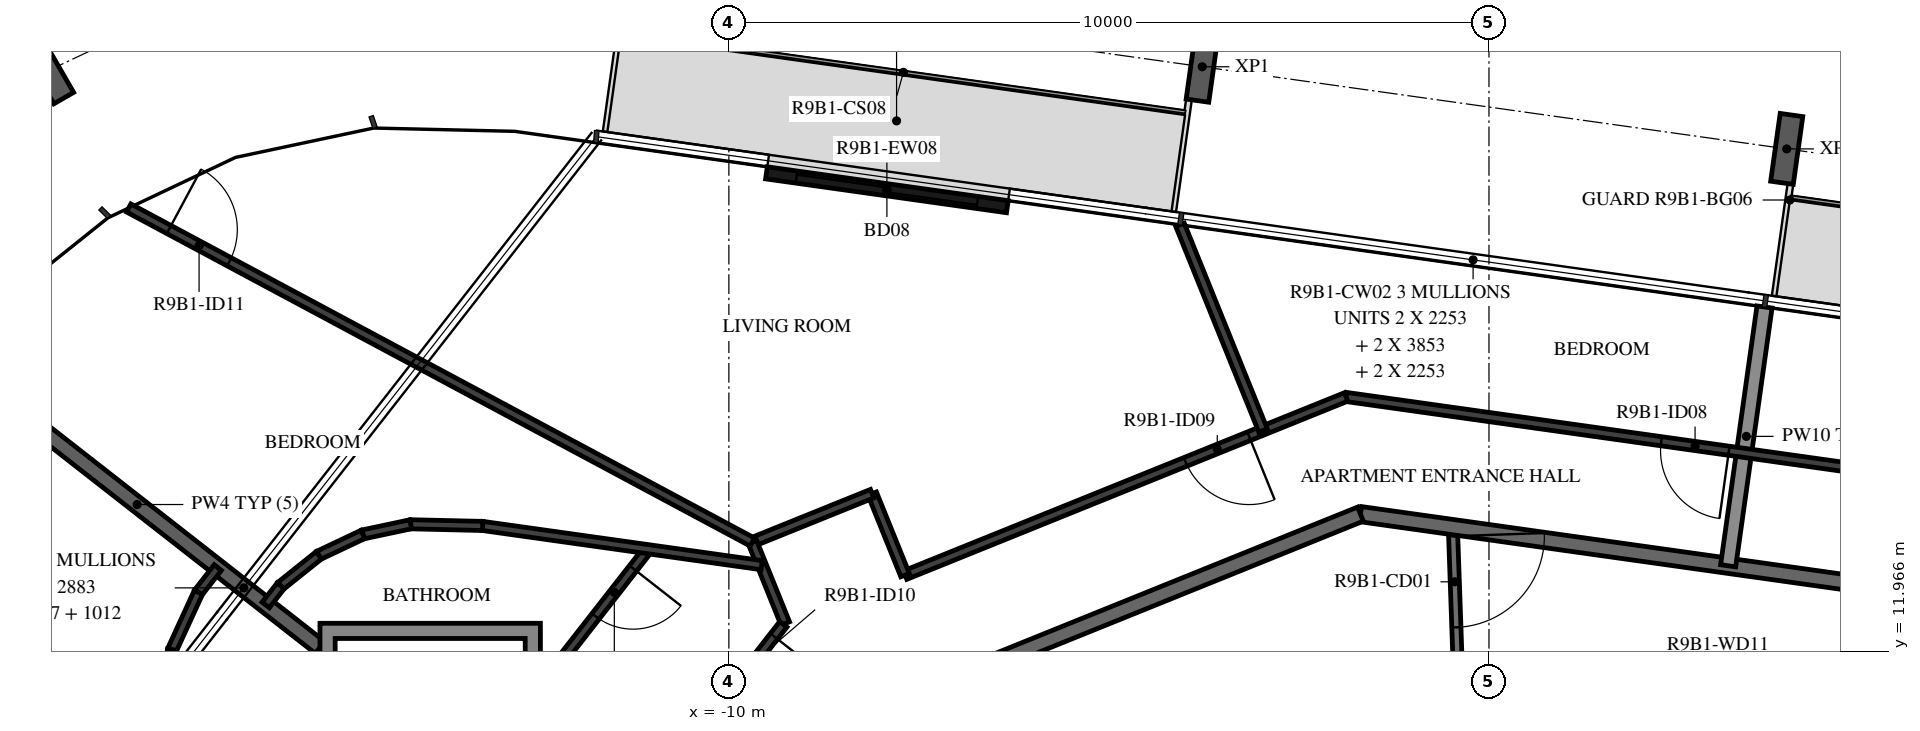
"""IFC4 building model, lengths in metres.
Left out: names, types, materials, properties, quantities, classifications, styles, units other than length and angle.
Written with IfcOpenShell. Run it as: python <this file> out.ifc"""

import sys

from ifc_helpers import new_model, si_unit, direction, frame, frame_2d, origin, origin_2d, place, context, subcontext, project, spatial, polyline, rectangle, i_section, outline, extrude, element, fill, save


model = new_model("IFC4")
c1 = context("Model", 3, precision=1e-05, world=origin(), true_north=direction((0.0, 1.0)))
c2 = subcontext(c1, "Body", "Model", "MODEL_VIEW")
j1 = project(units=[si_unit("LENGTHUNIT", "METRE"), si_unit("PLANEANGLEUNIT", "RADIAN")], contexts=[c1])
p1 = place(None, origin())
s1 = spatial("IfcSite", under=j1, at=p1, CompositionType="ELEMENT")
p2 = place(p1, origin())
s2 = spatial("IfcBuilding", under=s1, at=p2, CompositionType="ELEMENT")
p3 = place(p2, frame((0.0, 0.0, 343.5)))
s3 = spatial("IfcBuildingStorey", under=s2, at=p3, CompositionType="ELEMENT", Elevation=343.5)
for number, where, z_axis, x_axis in (
    (1, (3.917, 18.574, -0.38), (0.0, 0.0, 1.0), (0.99, -0.139, 0.0)),
    (2, (-3.773, 19.655, -0.38), (0.0, 0.0, 1.0), (0.99, -0.139, 0.0)),
    (3, (-18.976, 19.632, -0.38), (0.0, 0.0, 1.0), (0.866, 0.5, 0.0)),
):
    element("IfcColumn", number, at=place(p3, frame(where, z_axis=z_axis, x_axis=x_axis)), inside=s3, PredefinedType="COLUMN", context=c2, shape_type="SweptSolid", body=[
        extrude(i_section(OverallWidth=0.3, OverallDepth=0.9, WebThickness=0.019, FlangeThickness=0.035, FilletRadius=0.03, at=origin_2d()), origin(), (0.0, 0.0, 1.0), 3.5),
    ])
p4 = place(p3, frame((-6.337, 17.814, 0.0), z_axis=(0.0, 0.0, 1.0), x_axis=(-0.99026890462, 0.13916715325, 0.0)))
e4 = element("IfcWall", 4, at=p4, inside=s3, PredefinedType="STANDARD", context=c2, shape_type="SweptSolid", body=[
    extrude(rectangle(XDim=3.2, YDim=0.16, at=frame_2d((1.6, 0.0))), origin(), (0.0, 0.0, 1.0), 3.12),
])
p5 = place(p4, frame((0.4, 0.0, 0.0)))
e5 = element("IfcOpeningElement", 5, at=p5, cuts=e4, PredefinedType="OPENING", context=c2, shape_type="SweptSolid", body=[
    extrude(rectangle(XDim=2.4, YDim=2.4, at=frame_2d((1.2, 1.2))), frame((0.0, 0.09, 0.0), z_axis=(0.0, -1.0, 0.0), x_axis=(1.0, 0.0, 0.0)), (0.0, 0.0, 1.0), 0.18),
])
p6 = place(p3, frame((-0.475, 13.598, 0.0), z_axis=(0.0, 0.0, 1.0), x_axis=(0.034852521429, -0.999392466326, 0.0)))
e6 = element("IfcWall", 6, at=p6, inside=s3, PredefinedType="PARTITIONING", context=c2, shape_type="SweptSolid", body=[
    extrude(rectangle(XDim=1.702, YDim=0.12, at=frame_2d((0.851, 0.0))), origin(), (0.0, 0.0, 1.0), 3.12),
])
p7 = place(p6, frame((0.12, 0.0, 0.0)))
e7 = element("IfcOpeningElement", 7, at=p7, cuts=e6, PredefinedType="OPENING", context=c2, shape_type="SweptSolid", body=[
    extrude(rectangle(XDim=1.2, YDim=2.1, at=frame_2d((0.6, 1.05))), frame((0.0, 0.07, 0.0), z_axis=(0.0, -1.0, 0.0), x_axis=(1.0, 0.0, 0.0)), (0.0, 0.0, 1.0), 0.14),
])
p8 = place(p3, frame((5.42, 12.77, 0.0), z_axis=(0.0, 0.0, 1.0), x_axis=(-0.990270565508, 0.139155334385, 0.0)))
e8 = element("IfcWall", 8, at=p8, inside=s3, PredefinedType="STANDARD", context=c2, shape_type="SweptSolid", body=[
    extrude(rectangle(XDim=7.181, YDim=0.2, at=frame_2d((3.59, 0.0))), origin(), (0.0, 0.0, 1.0), 3.12),
])
p9 = place(p3, frame((-1.691, 13.769, 0.0), z_axis=(0.0, 0.0, 1.0), x_axis=(-0.92717916932, -0.374618189599, 0.0)))
e9 = element("IfcWall", 9, at=p9, inside=s3, PredefinedType="STANDARD", context=c2, shape_type="SweptSolid", body=[
    extrude(rectangle(XDim=7.181, YDim=0.2, at=frame_2d((3.591, 0.0))), origin(), (0.0, 0.0, 1.0), 3.12),
])
p10 = place(p3, frame((3.625, 16.494, 0.0), z_axis=(0.0, 0.0, 1.0), x_axis=(-0.139174320859, -0.990267897295, 0.0)))
e10 = element("IfcWall", 10, at=p10, inside=s3, PredefinedType="STANDARD", context=c2, shape_type="SweptSolid", body=[
    extrude(rectangle(XDim=3.438, YDim=0.2, at=frame_2d((1.719, 0.0))), origin(), (0.0, 0.0, 1.0), 2.73),
])
p11 = place(p3, frame((-20.191, 15.775, 0.0), z_axis=(0.0, 0.0, 1.0), x_axis=(0.788021948923, -0.615647145706, 0.0)))
e11 = element("IfcWall", 11, at=p11, inside=s3, PredefinedType="STANDARD", context=c2, shape_type="SweptSolid", body=[
    extrude(rectangle(XDim=6.106, YDim=0.2, at=frame_2d((3.053, 0.0))), origin(), (0.0, 0.0, 1.0), 3.12),
])
p12 = place(p3, frame((6.027, 14.199, 0.0), z_axis=(0.0, 0.0, 1.0), x_axis=(-0.990271593532, 0.139148018469, 0.0)))
e12 = element("IfcWall", 12, at=p12, inside=s3, PredefinedType="PARTITIONING", context=c2, shape_type="SweptSolid", body=[
    extrude(rectangle(XDim=7.985, YDim=0.12, at=frame_2d((3.992, 0.0))), origin(), (0.0, 0.0, 1.0), 3.12),
])
p13 = place(p12, frame((2.898, 0.0, 0.0)))
e13 = element("IfcOpeningElement", 13, at=p13, cuts=e12, PredefinedType="OPENING", context=c2, shape_type="SweptSolid", body=[
    extrude(rectangle(XDim=0.9, YDim=2.1, at=frame_2d((0.45, 1.05))), frame((0.0, 0.07, 0.0), z_axis=(0.0, -1.0, 0.0), x_axis=(1.0, 0.0, 0.0)), (0.0, 0.0, 1.0), 0.14),
])
p14 = place(p3, frame((-1.88, 15.311, 0.0), z_axis=(0.0, 0.0, 1.0), x_axis=(-0.927182163322, -0.374610779365, 0.0)))
e14 = element("IfcWall", 14, at=p14, inside=s3, PredefinedType="PARTITIONING", context=c2, shape_type="SweptSolid", body=[
    extrude(rectangle(XDim=6.257, YDim=0.12, at=frame_2d((3.128, 0.0))), origin(), (0.0, 0.0, 1.0), 3.12),
])
p15 = place(p14, frame((1.377, 0.0, 0.0)))
e15 = element("IfcOpeningElement", 15, at=p15, cuts=e14, PredefinedType="OPENING", context=c2, shape_type="SweptSolid", body=[
    extrude(rectangle(XDim=0.9, YDim=2.1, at=frame_2d((0.45, 1.05))), frame((0.0, 0.07, 0.0), z_axis=(0.0, -1.0, 0.0), x_axis=(1.0, 0.0, 0.0)), (0.0, 0.0, 1.0), 0.14),
])
p16 = place(p3, frame((-7.681, 12.967, 0.0), z_axis=(0.0, 0.0, 1.0), x_axis=(-0.374592224266, 0.927189659951, 0.0)))
e16 = element("IfcWall", 16, at=p16, inside=s3, PredefinedType="PARTITIONING", context=c2, shape_type="SweptSolid", body=[
    extrude(rectangle(XDim=1.156, YDim=0.12, at=frame_2d((0.578, 0.0))), origin(), (0.0, 0.0, 1.0), 3.12),
])
p17 = place(p3, frame((-8.115, 14.039, 0.0), z_axis=(0.0, 0.0, 1.0), x_axis=(-0.927153589835, -0.374681492546, 0.0)))
e17 = element("IfcWall", 17, at=p17, inside=s3, PredefinedType="PARTITIONING", context=c2, shape_type="SweptSolid", body=[
    extrude(rectangle(XDim=1.7, YDim=0.12, at=frame_2d((0.85, 0.0))), origin(), (0.0, 0.0, 1.0), 3.12),
])
p18 = place(p3, frame((-9.691, 13.402, 0.0), z_axis=(0.0, 0.0, 1.0), x_axis=(0.374484003097, -0.927233374844, 0.0)))
e18 = element("IfcWall", 18, at=p18, inside=s3, PredefinedType="PARTITIONING", context=c2, shape_type="SweptSolid", body=[
    extrude(rectangle(XDim=1.156, YDim=0.12, at=frame_2d((0.578, 0.0))), origin(), (0.0, 0.0, 1.0), 3.12),
])
p19 = place(p3, frame((-9.283, 12.319, 0.0), z_axis=(0.0, 0.0, 1.0), x_axis=(-0.61567489546, -0.788000268464, 0.0)))
e19 = element("IfcWall", 19, at=p19, inside=s3, PredefinedType="PARTITIONING", context=c2, shape_type="SweptSolid", body=[
    extrude(rectangle(XDim=7.985, YDim=0.12, at=frame_2d((3.992, 0.0))), origin(), (0.0, 0.0, 1.0), 3.12),
])
p20 = place(p19, frame((0.2, 0.0, 0.0)))
e20 = element("IfcOpeningElement", 20, at=p20, cuts=e19, PredefinedType="OPENING", context=c2, shape_type="SweptSolid", body=[
    extrude(rectangle(XDim=0.9, YDim=2.1, at=frame_2d((0.45, 1.05))), frame((0.0, 0.07, 0.0), z_axis=(0.0, -1.0, 0.0), x_axis=(1.0, 0.0, 0.0)), (0.0, 0.0, 1.0), 0.14),
])
p21 = place(p19, frame((4.592, 0.0, 0.0)))
e21 = element("IfcOpeningElement", 21, at=p21, cuts=e19, PredefinedType="OPENING", context=c2, shape_type="SweptSolid", body=[
    extrude(rectangle(XDim=0.9, YDim=2.1, at=frame_2d((0.45, 1.05))), frame((0.0, 0.07, 0.0), z_axis=(0.0, -1.0, 0.0), x_axis=(1.0, 0.0, 0.0)), (0.0, 0.0, 1.0), 0.14),
])
p22 = place(p3, frame((-4.065, 17.575, 0.0), z_axis=(0.0, 0.0, 1.0), x_axis=(0.374619347258, -0.927178701578, 0.0)))
e22 = element("IfcWall", 22, at=p22, inside=s3, PredefinedType="PARTITIONING", context=c2, shape_type="SweptSolid", body=[
    extrude(rectangle(XDim=2.918, YDim=0.12, at=frame_2d((1.459, 0.0))), origin(), (0.0, 0.0, 1.0), 3.12),
])
p23 = place(p3, frame((-17.896, 17.797, 0.0), z_axis=(0.0, 0.0, 1.0), x_axis=(0.88150492406, -0.4721748287, 0.0)))
e23 = element("IfcWall", 23, at=p23, inside=s3, PredefinedType="PARTITIONING", context=c2, shape_type="SweptSolid", body=[
    extrude(rectangle(XDim=9.308, YDim=0.12, at=frame_2d((4.654, 0.0))), origin(), (0.0, 0.0, 1.0), 3.12),
])
p24 = place(p23, frame((0.6, 0.0, 0.0)))
e24 = element("IfcOpeningElement", 24, at=p24, cuts=e23, PredefinedType="OPENING", context=c2, shape_type="SweptSolid", body=[
    extrude(rectangle(XDim=0.9, YDim=2.1, at=frame_2d((0.45, 1.05))), frame((0.0, 0.07, 0.0), z_axis=(0.0, -1.0, 0.0), x_axis=(1.0, 0.0, 0.0)), (0.0, 0.0, 1.0), 0.14),
])
p25 = place(p3, frame((-11.064, 13.308, 0.0), z_axis=(0.0, 0.0, 1.0), x_axis=(-0.615681126827, -0.787995399777, 0.0)))
e25 = element("IfcWall", 25, at=p25, inside=s3, PredefinedType="PARTITIONING", context=c2, shape_type="SweptSolid", body=[
    extrude(rectangle(XDim=2.3, YDim=0.12, at=frame_2d((1.15, 0.0))), origin(), (0.0, 0.0, 1.0), 3.12),
])
p26 = place(p25, frame((0.32, 0.0, 0.0)))
e26 = element("IfcOpeningElement", 26, at=p26, cuts=e25, PredefinedType="OPENING", context=c2, shape_type="SweptSolid", body=[
    extrude(rectangle(XDim=0.8, YDim=2.1, at=frame_2d((0.4, 1.05))), frame((0.0, 0.07, 0.0), z_axis=(0.0, -1.0, 0.0), x_axis=(1.0, 0.0, 0.0)), (0.0, 0.0, 1.0), 0.14),
])
p27 = place(p3, frame((-9.568, 13.097, 0.0), z_axis=(0.0, 0.0, 1.0), x_axis=(-0.990266931728, 0.13918119099, 0.0)))
e27 = element("IfcWall", 27, at=p27, inside=s3, PredefinedType="PARTITIONING", context=c2, shape_type="SweptSolid", body=[
    extrude(rectangle(XDim=3.708, YDim=0.12, at=frame_2d((1.854, 0.0))), origin(), (0.0, 0.0, 1.0), 3.12),
])
p28 = place(p3, frame((-13.24, 13.614, 0.0), z_axis=(0.0, 0.0, 1.0), x_axis=(-0.999730529074, 0.023213557177, 0.0)))
e28 = element("IfcWall", 28, at=p28, inside=s3, PredefinedType="PARTITIONING", context=c2, shape_type="SweptSolid", body=[
    extrude(rectangle(XDim=0.947, YDim=0.12, at=frame_2d((0.473, 0.0))), origin(), (0.0, 0.0, 1.0), 3.12),
])
p29 = place(p3, frame((-14.186, 13.635, 0.0), z_axis=(0.0, 0.0, 1.0), x_axis=(-0.978217752025, -0.207581380725, 0.0)))
e29 = element("IfcWall", 29, at=p29, inside=s3, PredefinedType="PARTITIONING", context=c2, shape_type="SweptSolid", body=[
    extrude(rectangle(XDim=0.642, YDim=0.12, at=frame_2d((0.321, 0.0))), origin(), (0.0, 0.0, 1.0), 3.12),
])
for number, where, z_axis, x_axis in (
    (30, (-14.814, 13.502, 0.0), (0.0, 0.0, 1.0), (-0.904, -0.428, 0.0)),
    (31, (-15.395, 13.227, 0.0), (0.0, 0.0, 1.0), (-0.781, -0.625, 0.0)),
):
    element("IfcWall", number, at=place(p3, frame(where, z_axis=z_axis, x_axis=x_axis)), inside=s3, PredefinedType="PARTITIONING", context=c2, shape_type="SweptSolid", body=[
        extrude(rectangle(XDim=0.642, YDim=0.12, at=frame_2d((0.321, 0.0))), origin(), (0.0, 0.0, 1.0), 3.12),
    ])
p30 = place(p3, frame((-15.896, 12.826, 0.0), z_axis=(0.0, 0.0, 1.0), x_axis=(-0.615466865985, -0.788162760396, 0.0)))
e32 = element("IfcWall", 32, at=p30, inside=s3, PredefinedType="PARTITIONING", context=c2, shape_type="SweptSolid", body=[
    extrude(rectangle(XDim=0.321, YDim=0.12, at=frame_2d((0.16, 0.0))), origin(), (0.0, 0.0, 1.0), 3.12),
])
p31 = place(p3, frame((-16.724, 13.066, 0.0), z_axis=(0.0, 0.0, 1.0), x_axis=(-0.615895388651, -0.787827944565, 0.0)))
e33 = element("IfcWall", 33, at=p31, inside=s3, PredefinedType="PARTITIONING", context=c2, shape_type="SweptSolid", body=[
    extrude(rectangle(XDim=0.415, YDim=0.12, at=frame_2d((0.207, 0.0))), origin(), (0.0, 0.0, 1.0), 3.12),
])
for number, where, z_axis, x_axis in (
    (34, (-16.979, 12.74, 0.0), (0.0, 0.0, 1.0), (-0.417, -0.909, 0.0)),
    (35, (-17.325, 11.986, 0.0), (0.0, 0.0, 1.0), (-0.197, -0.98, 0.0)),
):
    element("IfcWall", number, at=place(p3, frame(where, z_axis=z_axis, x_axis=x_axis)), inside=s3, PredefinedType="PARTITIONING", context=c2, shape_type="SweptSolid", body=[
        extrude(rectangle(XDim=0.829, YDim=0.12, at=frame_2d((0.415, 0.0))), origin(), (0.0, 0.0, 1.0), 3.12),
    ])
p32 = place(p3, origin())
e36 = element("IfcWall", 36, at=p32, inside=s3, PredefinedType="STANDARD", context=c2, shape_type="SweptSolid", body=[
    extrude(outline(polyline([(-12.479, 12.333), (-12.479, 9.433), (-15.379, 9.433), (-15.379, 12.333), (-12.479, 12.333)]), holes=[polyline([(-15.179, 9.633), (-12.679, 9.633), (-12.679, 12.133), (-15.179, 12.133), (-15.179, 9.633)])]), origin(), (0.0, 0.0, 1.0), 3.12),
])
p33 = place(p5, origin())
e37 = element("IfcDoor", 37, at=p33, inside=s3, OperationType="DOUBLE_DOOR_SLIDING", PredefinedType="DOOR", context=c2, shape_type="SweptSolid", body=[
    extrude(rectangle(XDim=2.4, YDim=2.4, at=frame_2d((1.2, 1.2))), frame((0.0, 0.025, 0.0), z_axis=(0.0, -1.0, 0.0), x_axis=(1.0, 0.0, 0.0)), (0.0, 0.0, 1.0), 0.05),
])
fill(e5, e37)
p34 = place(p13, origin())
e38 = element("IfcDoor", 38, at=p34, inside=s3, OperationType="SINGLE_SWING_LEFT", PredefinedType="DOOR", context=c2, shape_type="SweptSolid", body=[
    extrude(rectangle(XDim=0.9, YDim=2.1, at=frame_2d((0.45, 1.05))), frame((0.0, 0.025, 0.0), z_axis=(0.0, -1.0, 0.0), x_axis=(1.0, 0.0, 0.0)), (0.0, 0.0, 1.0), 0.05),
])
fill(e13, e38)
p35 = place(p15, origin())
e39 = element("IfcDoor", 39, at=p35, inside=s3, OperationType="SINGLE_SWING_RIGHT", PredefinedType="DOOR", context=c2, shape_type="SweptSolid", body=[
    extrude(rectangle(XDim=0.9, YDim=2.1, at=frame_2d((0.45, 1.05))), frame((0.0, 0.025, 0.0), z_axis=(0.0, -1.0, 0.0), x_axis=(1.0, 0.0, 0.0)), (0.0, 0.0, 1.0), 0.05),
])
fill(e15, e39)
p36 = place(p20, origin())
e40 = element("IfcDoor", 40, at=p36, inside=s3, OperationType="SINGLE_SWING_RIGHT", PredefinedType="DOOR", context=c2, shape_type="SweptSolid", body=[
    extrude(rectangle(XDim=0.9, YDim=2.1, at=frame_2d((0.45, 1.05))), frame((0.0, 0.025, 0.0), z_axis=(0.0, -1.0, 0.0), x_axis=(1.0, 0.0, 0.0)), (0.0, 0.0, 1.0), 0.05),
])
fill(e20, e40)
p37 = place(p26, origin())
e41 = element("IfcDoor", 41, at=p37, inside=s3, OperationType="SINGLE_SWING_RIGHT", PredefinedType="DOOR", context=c2, shape_type="SweptSolid", body=[
    extrude(rectangle(XDim=0.8, YDim=2.1, at=frame_2d((0.4, 1.05))), frame((0.0, 0.025, 0.0), z_axis=(0.0, -1.0, 0.0), x_axis=(1.0, 0.0, 0.0)), (0.0, 0.0, 1.0), 0.05),
])
fill(e26, e41)
p38 = place(p24, origin())
e42 = element("IfcDoor", 42, at=p38, inside=s3, OperationType="SINGLE_SWING_RIGHT", PredefinedType="DOOR", context=c2, shape_type="SweptSolid", body=[
    extrude(rectangle(XDim=0.9, YDim=2.1, at=frame_2d((0.45, 1.05))), frame((0.0, 0.025, 0.0), z_axis=(0.0, -1.0, 0.0), x_axis=(1.0, 0.0, 0.0)), (0.0, 0.0, 1.0), 0.05),
])
fill(e24, e42)
p39 = place(p7, origin())
e43 = element("IfcDoor", 43, at=p39, inside=s3, OperationType="DOUBLE_DOOR_SINGLE_SWING", PredefinedType="DOOR", context=c2, shape_type="SweptSolid", body=[
    extrude(rectangle(XDim=1.2, YDim=2.1, at=frame_2d((0.6, 1.05))), frame((0.0, 0.025, 0.0), z_axis=(0.0, -1.0, 0.0), x_axis=(1.0, 0.0, 0.0)), (0.0, 0.0, 1.0), 0.05),
])
fill(e7, e43)
save(model, sys.argv[1])
